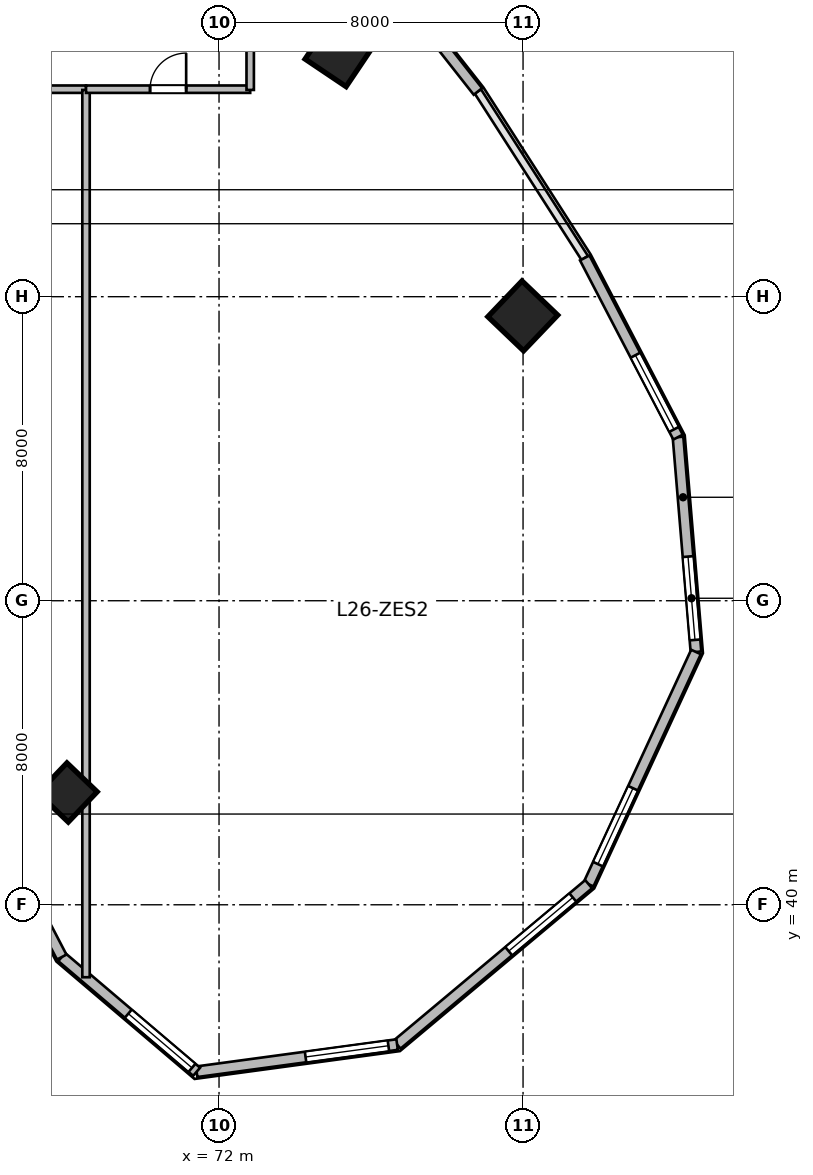
"""IFC4 building model, lengths in metres.
Left out: names, types, materials, properties, quantities, classifications, styles, units other than length and angle.
Written with IfcOpenShell. Run it as: python <this file> out.ifc"""

import sys

from ifc_helpers import new_model, si_unit, direction, frame, frame_2d, origin, origin_2d, place, context, subcontext, project, spatial, rectangle, extrude, source, transform, mapped, element, fill, save


model = new_model("IFC4")
c1 = context("Model", 3, precision=1e-05, world=origin(), true_north=direction((0.0, 1.0)))
c2 = subcontext(c1, "Body", "Model", "MODEL_VIEW")
j1 = project(units=[si_unit("LENGTHUNIT", "METRE"), si_unit("PLANEANGLEUNIT", "RADIAN")], contexts=[c1])
p1 = place(None, origin())
s1 = spatial("IfcSite", under=j1, at=p1, CompositionType="ELEMENT")
p2 = place(p1, origin())
s2 = spatial("IfcBuilding", under=s1, at=p2, CompositionType="ELEMENT")
p3 = place(p2, frame((0.0, 0.0, 111.6)))
s3 = spatial("IfcBuildingStorey", under=s2, at=p3, CompositionType="ELEMENT", Elevation=111.6)
m1 = source(origin(), c2, "Body", "SweptSolid", [
    extrude(rectangle(XDim=1.3, YDim=1.3, at=origin_2d()), origin(), (0.0, 0.0, 1.0), 3.9),
])
p4 = place(p3, frame((75.167, 62.43, 0.0), z_axis=(0.0, 0.0, 1.0), x_axis=(0.55774510898, 0.830012285095, 0.0)))
e1 = element("IfcColumn", 1, at=p4, inside=s3, PredefinedType="COLUMN", context=c2, shape_type="MappedRepresentation", body=[
    mapped(m1, transform((0.0, 0.0, 0.0), scale=1.0)),
])
m2 = source(origin(), c2, "Body", "SweptSolid", [
    extrude(rectangle(XDim=1.1, YDim=1.1, at=origin_2d()), origin(), (0.0, 0.0, 1.0), 3.9),
])
p5 = place(p3, frame((68.015, 42.955, 0.0), z_axis=(0.0, 0.0, 1.0), x_axis=(0.690756218984, 0.723087716626, 0.0)))
e2 = element("IfcColumn", 2, at=p5, inside=s3, PredefinedType="COLUMN", context=c2, shape_type="MappedRepresentation", body=[
    mapped(m2, transform((0.0, 0.0, 0.0), scale=1.0)),
])
p6 = place(p3, frame((79.993, 55.494, 0.0), z_axis=(0.0, 0.0, 1.0), x_axis=(0.690756218984, 0.723087716626, 0.0)))
e3 = element("IfcColumn", 3, at=p6, inside=s3, PredefinedType="COLUMN", context=c2, shape_type="MappedRepresentation", body=[
    mapped(m1, transform((0.0, 0.0, 0.0), scale=1.0)),
])
m3 = source(origin(), c2, "Body", "SweptSolid", [
    extrude(rectangle(XDim=5.674, YDim=0.28, at=frame_2d((2.837, 0.0))), origin(), (0.0, 0.0, 1.0), 3.65),
])
p7 = place(p3, frame((84.078, 52.305, 0.0), z_axis=(0.0, 0.0, 1.0), x_axis=(0.083309007867, -0.996523762491, 0.0)))
e4 = element("IfcWall", 4, at=p7, inside=s3, PredefinedType="SOLIDWALL", context=c2, shape_type="MappedRepresentation", body=[
    mapped(m3, transform((0.0, 0.0, 0.0), scale=1.0)),
])
p8 = place(p7, frame((3.155, 0.0, 0.95)))
e5 = element("IfcOpeningElement", 5, at=p8, cuts=e4, PredefinedType="OPENING", context=c2, shape_type="SweptSolid", body=[
    extrude(rectangle(XDim=2.2, YDim=2.1, at=frame_2d((1.1, 1.05))), frame((0.0, 0.15, 0.0), z_axis=(0.0, -1.0, 0.0), x_axis=(1.0, 0.0, 0.0)), (0.0, 0.0, 1.0), 0.3),
])
m4 = source(origin(), c2, "Body", "SweptSolid", [
    extrude(rectangle(XDim=6.732, YDim=0.28, at=frame_2d((3.366, 0.0))), origin(), (0.0, 0.0, 1.0), 3.65),
])
p9 = place(p3, frame((84.55, 46.652, 0.0), z_axis=(0.0, 0.0, 1.0), x_axis=(-0.419644552709, -0.907688520023, 0.0)))
e6 = element("IfcWall", 6, at=p9, inside=s3, PredefinedType="SOLIDWALL", context=c2, shape_type="MappedRepresentation", body=[
    mapped(m4, transform((0.0, 0.0, 0.0), scale=1.0)),
])
p10 = place(p9, frame((3.949, 0.0, 0.95)))
e7 = element("IfcOpeningElement", 7, at=p10, cuts=e6, PredefinedType="OPENING", context=c2, shape_type="SweptSolid", body=[
    extrude(rectangle(XDim=2.2, YDim=2.1, at=frame_2d((1.1, 1.05))), frame((0.0, 0.15, 0.0), z_axis=(0.0, -1.0, 0.0), x_axis=(1.0, 0.0, 0.0)), (0.0, 0.0, 1.0), 0.3),
])
m5 = source(origin(), c2, "Body", "SweptSolid", [
    extrude(rectangle(XDim=6.573, YDim=0.28, at=frame_2d((3.287, 0.0))), origin(), (0.0, 0.0, 1.0), 3.65),
])
p11 = place(p3, frame((81.725, 40.541, 0.0), z_axis=(0.0, 0.0, 1.0), x_axis=(-0.766715154163, -0.641987439423, 0.0)))
e8 = element("IfcWall", 8, at=p11, inside=s3, PredefinedType="SOLIDWALL", context=c2, shape_type="MappedRepresentation", body=[
    mapped(m5, transform((0.0, 0.0, 0.0), scale=1.0)),
])
p12 = place(p11, frame((0.543, 0.0, 0.95)))
e9 = element("IfcOpeningElement", 9, at=p12, cuts=e8, PredefinedType="OPENING", context=c2, shape_type="SweptSolid", body=[
    extrude(rectangle(XDim=2.2, YDim=2.1, at=frame_2d((1.1, 1.05))), frame((0.0, 0.15, 0.0), z_axis=(0.0, -1.0, 0.0), x_axis=(1.0, 0.0, 0.0)), (0.0, 0.0, 1.0), 0.3),
])
m6 = source(origin(), c2, "Body", "SweptSolid", [
    extrude(rectangle(XDim=5.324, YDim=0.28, at=frame_2d((2.662, 0.0))), origin(), (0.0, 0.0, 1.0), 3.65),
])
p13 = place(p3, frame((76.686, 36.322, 0.0), z_axis=(0.0, 0.0, 1.0), x_axis=(-0.990931467223, -0.134368252451, 0.0)))
e10 = element("IfcWall", 10, at=p13, inside=s3, PredefinedType="SOLIDWALL", context=c2, shape_type="MappedRepresentation", body=[
    mapped(m6, transform((0.0, 0.0, 0.0), scale=1.0)),
])
p14 = place(p13, frame((0.231, 0.0, 0.95)))
e11 = element("IfcOpeningElement", 11, at=p14, cuts=e10, PredefinedType="OPENING", context=c2, shape_type="SweptSolid", body=[
    extrude(rectangle(XDim=2.2, YDim=2.1, at=frame_2d((1.1, 1.05))), frame((0.0, 0.15, 0.0), z_axis=(0.0, -1.0, 0.0), x_axis=(1.0, 0.0, 0.0)), (0.0, 0.0, 1.0), 0.3),
])
m7 = source(origin(), c2, "Body", "SweptSolid", [
    extrude(rectangle(XDim=4.659, YDim=0.28, at=frame_2d((2.33, 0.0))), origin(), (0.0, 0.0, 1.0), 3.65),
])
p15 = place(p3, frame((71.41, 35.606, 0.0), z_axis=(0.0, 0.0, 1.0), x_axis=(-0.761913458795, 0.647678841176, 0.0)))
e12 = element("IfcWall", 12, at=p15, inside=s3, PredefinedType="SOLIDWALL", context=c2, shape_type="MappedRepresentation", body=[
    mapped(m7, transform((0.0, 0.0, 0.0), scale=1.0)),
])
p16 = place(p15, frame((0.16, 0.0, 0.95)))
e13 = element("IfcOpeningElement", 13, at=p16, cuts=e12, PredefinedType="OPENING", context=c2, shape_type="SweptSolid", body=[
    extrude(rectangle(XDim=2.2, YDim=2.1, at=frame_2d((1.1, 1.05))), frame((0.0, 0.15, 0.0), z_axis=(0.0, -1.0, 0.0), x_axis=(1.0, 0.0, 0.0)), (0.0, 0.0, 1.0), 0.3),
])
m8 = source(origin(), c2, "Body", "SweptSolid", [
    extrude(rectangle(XDim=2.88, YDim=0.28, at=frame_2d((1.44, 0.0))), origin(), (0.0, 0.0, 1.0), 3.65),
])
p17 = place(p3, frame((67.861, 38.624, 0.0), z_axis=(0.0, 0.0, 1.0), x_axis=(-0.461769086658, 0.887000175088, 0.0)))
e14 = element("IfcWall", 14, at=p17, inside=s3, PredefinedType="SOLIDWALL", context=c2, shape_type="MappedRepresentation", body=[
    mapped(m8, transform((0.0, 0.0, 0.0), scale=1.0)),
])
m9 = source(origin(), c2, "Body", "SweptSolid", [
    extrude(rectangle(XDim=5.058, YDim=0.28, at=frame_2d((2.529, 0.0))), origin(), (0.0, 0.0, 1.0), 3.65),
])
p18 = place(p3, frame((75.685, 65.376, 0.0), z_axis=(0.0, 0.0, 1.0), x_axis=(0.618145507434, -0.786063694391, 0.0)))
e15 = element("IfcWall", 15, at=p18, inside=s3, PredefinedType="SOLIDWALL", context=c2, shape_type="MappedRepresentation", body=[
    mapped(m9, transform((0.0, 0.0, 0.0), scale=1.0)),
])
m10 = source(origin(), c2, "Body", "SweptSolid", [
    extrude(rectangle(XDim=5.315, YDim=0.28, at=frame_2d((2.658, 0.0))), origin(), (0.0, 0.0, 1.0), 3.65),
])
p19 = place(p3, frame((81.623, 57.02, 0.0), z_axis=(0.0, 0.0, 1.0), x_axis=(0.461760527822, -0.887004630735, 0.0)))
e16 = element("IfcWall", 16, at=p19, inside=s3, PredefinedType="SOLIDWALL", context=c2, shape_type="MappedRepresentation", body=[
    mapped(m10, transform((0.0, 0.0, 0.0), scale=1.0)),
])
p20 = place(p19, frame((2.886, 0.0, 0.95)))
e17 = element("IfcOpeningElement", 17, at=p20, cuts=e16, PredefinedType="OPENING", context=c2, shape_type="SweptSolid", body=[
    extrude(rectangle(XDim=2.2, YDim=2.1, at=frame_2d((1.1, 1.05))), frame((0.0, 0.15, 0.0), z_axis=(0.0, -1.0, 0.0), x_axis=(1.0, 0.0, 0.0)), (0.0, 0.0, 1.0), 0.3),
])
m11 = source(origin(), c2, "Body", "SweptSolid", [
    extrude(rectangle(XDim=6.9, YDim=0.195, at=frame_2d((3.45, 0.0))), origin(), (0.0, 0.0, 1.0), 3.65),
])
p21 = place(p3, frame((61.6, 61.46, 0.0), z_axis=(0.0, 0.0, 1.0), x_axis=(1.0, 0.0, 0.0)))
e18 = element("IfcWall", 18, at=p21, inside=s3, PredefinedType="PARTITIONING", context=c2, shape_type="MappedRepresentation", body=[
    mapped(m11, transform((0.0, 0.0, 0.0), scale=1.0)),
])
p22 = place(p21, frame((2.975, 0.0, 0.0)))
e19 = element("IfcOpeningElement", 19, at=p22, cuts=e18, PredefinedType="OPENING", context=c2, shape_type="SweptSolid", body=[
    extrude(rectangle(XDim=0.95, YDim=2.1, at=frame_2d((0.475, 1.05))), frame((0.0, 0.107, 0.0), z_axis=(0.0, -1.0, 0.0), x_axis=(1.0, 0.0, 0.0)), (0.0, 0.0, 1.0), 0.215),
])
m12 = source(origin(), c2, "Body", "SweptSolid", [
    extrude(rectangle(XDim=23.346, YDim=0.195, at=frame_2d((11.673, 0.0))), origin(), (0.0, 0.0, 1.0), 2.942),
])
p23 = place(p3, frame((68.5, 38.094, 0.0), z_axis=(0.0, 0.0, 1.0), x_axis=(0.0, 1.0, 0.0)))
e20 = element("IfcWall", 20, at=p23, inside=s3, PredefinedType="PARTITIONING", context=c2, shape_type="MappedRepresentation", body=[
    mapped(m12, transform((0.0, 0.0, 0.0), scale=1.0)),
])
m13 = source(origin(), c2, "Body", "SweptSolid", [
    extrude(rectangle(XDim=4.32, YDim=0.195, at=frame_2d((2.16, 0.0))), origin(), (0.0, 0.0, 1.0), 3.65),
])
p24 = place(p3, frame((68.5, 61.46, 0.0), z_axis=(0.0, 0.0, 1.0), x_axis=(1.0, 0.0, 0.0)))
e21 = element("IfcWall", 21, at=p24, inside=s3, PredefinedType="PARTITIONING", context=c2, shape_type="MappedRepresentation", body=[
    mapped(m13, transform((0.0, 0.0, 0.0), scale=1.0)),
])
p25 = place(p24, frame((1.685, 0.0, 0.0)))
e22 = element("IfcOpeningElement", 22, at=p25, cuts=e21, PredefinedType="OPENING", context=c2, shape_type="SweptSolid", body=[
    extrude(rectangle(XDim=0.95, YDim=2.1, at=frame_2d((0.475, 1.05))), frame((0.0, 0.107, 0.0), z_axis=(0.0, -1.0, 0.0), x_axis=(1.0, 0.0, 0.0)), (0.0, 0.0, 1.0), 0.215),
])
m14 = source(origin(), c2, "Body", "SweptSolid", [
    extrude(rectangle(XDim=2.62, YDim=0.195, at=frame_2d((1.31, 0.0))), origin(), (0.0, 0.0, 1.0), 3.324),
])
p26 = place(p3, frame((72.82, 61.44, 0.0), z_axis=(0.0, 0.0, 1.0), x_axis=(0.0, 1.0, 0.0)))
e23 = element("IfcWall", 23, at=p26, inside=s3, PredefinedType="PARTITIONING", context=c2, shape_type="MappedRepresentation", body=[
    mapped(m14, transform((0.0, 0.0, 0.0), scale=1.0)),
])
m15 = source(origin(), c2, "Body", "SweptSolid", [
    extrude(rectangle(XDim=2.2, YDim=2.1, at=frame_2d((1.1, 1.05))), frame((0.0, 0.03, 0.0), z_axis=(0.0, -1.0, 0.0), x_axis=(1.0, 0.0, 0.0)), (0.0, 0.0, 1.0), 0.06),
])
p27 = place(p8, origin())
e24 = element("IfcWindow", 24, at=p27, inside=s3, PartitioningType="TRIPLE_PANEL_VERTICAL", PredefinedType="WINDOW", context=c2, shape_type="MappedRepresentation", body=[
    mapped(m15, transform((0.0, 0.0, 0.0), scale=1.0)),
])
fill(e5, e24)
p28 = place(p10, origin())
e25 = element("IfcWindow", 25, at=p28, inside=s3, PartitioningType="TRIPLE_PANEL_VERTICAL", PredefinedType="WINDOW", context=c2, shape_type="MappedRepresentation", body=[
    mapped(m15, transform((0.0, 0.0, 0.0), scale=1.0)),
])
fill(e7, e25)
p29 = place(p12, origin())
e26 = element("IfcWindow", 26, at=p29, inside=s3, PartitioningType="TRIPLE_PANEL_VERTICAL", PredefinedType="WINDOW", context=c2, shape_type="MappedRepresentation", body=[
    mapped(m15, transform((0.0, 0.0, 0.0), scale=1.0)),
])
fill(e9, e26)
p30 = place(p14, origin())
e27 = element("IfcWindow", 27, at=p30, inside=s3, PartitioningType="TRIPLE_PANEL_VERTICAL", PredefinedType="WINDOW", context=c2, shape_type="MappedRepresentation", body=[
    mapped(m15, transform((0.0, 0.0, 0.0), scale=1.0)),
])
fill(e11, e27)
p31 = place(p16, origin())
e28 = element("IfcWindow", 28, at=p31, inside=s3, PartitioningType="TRIPLE_PANEL_VERTICAL", PredefinedType="WINDOW", context=c2, shape_type="MappedRepresentation", body=[
    mapped(m15, transform((0.0, 0.0, 0.0), scale=1.0)),
])
fill(e13, e28)
p32 = place(p20, origin())
e29 = element("IfcWindow", 29, at=p32, inside=s3, PartitioningType="TRIPLE_PANEL_VERTICAL", PredefinedType="WINDOW", context=c2, shape_type="MappedRepresentation", body=[
    mapped(m15, transform((0.0, 0.0, 0.0), scale=1.0)),
])
fill(e17, e29)
m16 = source(origin(), c2, "Body", "SweptSolid", [
    extrude(rectangle(XDim=0.95, YDim=2.1, at=frame_2d((0.475, 1.05))), frame((0.0, 0.025, 0.0), z_axis=(0.0, -1.0, 0.0), x_axis=(1.0, 0.0, 0.0)), (0.0, 0.0, 1.0), 0.05),
])
p33 = place(p25, origin())
e30 = element("IfcDoor", 30, at=p33, inside=s3, OperationType="SINGLE_SWING_RIGHT", PredefinedType="DOOR", context=c2, shape_type="MappedRepresentation", body=[
    mapped(m16, transform((0.0, 0.0, 0.0), scale=1.0)),
])
fill(e22, e30)
save(model, sys.argv[1])
